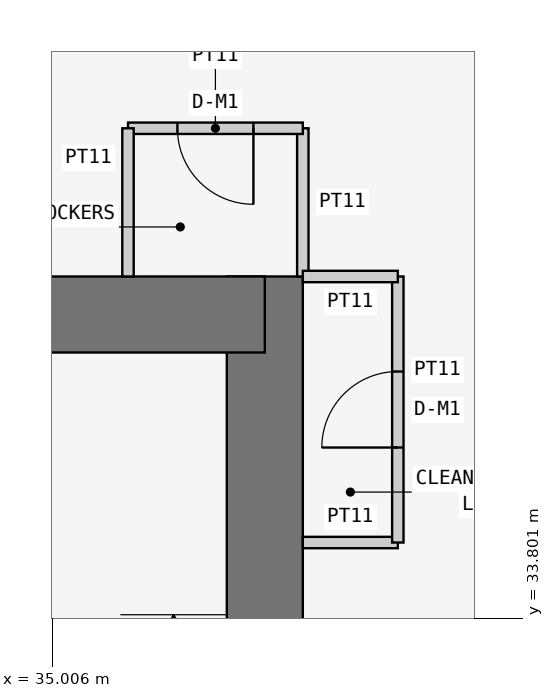
"""IFC4 building model, lengths in metres.
Left out: names, types, materials, properties, quantities, classifications, styles, units other than length and angle.
Written with IfcOpenShell. Run it as: python <this file> out.ifc"""

import sys

from ifc_helpers import new_model, si_unit, direction, frame, frame_2d, origin, place, context, subcontext, project, spatial, rectangle, extrude, element, fill, save


model = new_model("IFC4")
c1 = context("Model", 3, precision=1e-05, world=origin(), true_north=direction((0.0, 1.0)))
c2 = subcontext(c1, "Body", "Model", "MODEL_VIEW")
j1 = project(units=[si_unit("LENGTHUNIT", "METRE"), si_unit("PLANEANGLEUNIT", "RADIAN")], contexts=[c1])
p1 = place(None, origin())
s1 = spatial("IfcSite", under=j1, at=p1, CompositionType="ELEMENT")
p2 = place(p1, origin())
s2 = spatial("IfcBuilding", under=s1, at=p2, CompositionType="ELEMENT")
p3 = place(p2, frame((0.0, 0.0, 92.1)))
s3 = spatial("IfcBuildingStorey", under=s2, at=p3, CompositionType="ELEMENT", Elevation=92.1)
p4 = place(p3, frame((37.8, 21.0, 0.0), z_axis=(0.0, 0.0, 1.0), x_axis=(0.0, 1.0, 0.0)))
e1 = element("IfcWall", 1, at=p4, inside=s3, PredefinedType="SHEAR", context=c2, shape_type="SweptSolid", body=[
    extrude(rectangle(XDim=17.3, YDim=1.0, at=frame_2d((8.65, 0.0))), origin(), (0.0, 0.0, 1.0), 3.6),
])
p5 = place(p4, frame((5.2, 0.0, 0.0)))
e2 = element("IfcOpeningElement", 2, at=p5, cuts=e1, PredefinedType="OPENING", context=c2, shape_type="SweptSolid", body=[
    extrude(rectangle(XDim=1.2, YDim=2.1, at=frame_2d((0.6, 1.05))), frame((0.0, 0.51, 0.0), z_axis=(0.0, -1.0, 0.0), x_axis=(1.0, 0.0, 0.0)), (0.0, 0.0, 1.0), 1.02),
])
p6 = place(p3, frame((37.8, 37.8, 0.0), z_axis=(0.0, 0.0, 1.0), x_axis=(-1.0, 0.0, 0.0)))
e3 = element("IfcWall", 3, at=p6, inside=s3, PredefinedType="SHEAR", context=c2, shape_type="SweptSolid", body=[
    extrude(rectangle(XDim=17.3, YDim=1.0, at=frame_2d((8.65, 0.0))), origin(), (0.0, 0.0, 1.0), 3.6),
])
p7 = place(p3, frame((38.3, 38.3, 0.0), z_axis=(0.0, 0.0, 1.0), x_axis=(0.0, 1.0, 0.0)))
e4 = element("IfcWall", 4, at=p7, inside=s3, PredefinedType="PARTITIONING", context=c2, shape_type="SweptSolid", body=[
    extrude(rectangle(XDim=1.95, YDim=0.15, at=frame_2d((0.975, 0.0))), origin(), (0.0, 0.0, 1.0), 3.45),
])
p8 = place(p3, frame((38.3, 40.25, 0.0), z_axis=(0.0, 0.0, 1.0), x_axis=(-1.0, 0.0, 0.0)))
e5 = element("IfcWall", 5, at=p8, inside=s3, PredefinedType="PARTITIONING", context=c2, shape_type="SweptSolid", body=[
    extrude(rectangle(XDim=2.3, YDim=0.15, at=frame_2d((1.15, 0.0))), origin(), (0.0, 0.0, 1.0), 3.45),
])
p9 = place(p8, frame((0.65, 0.0, 0.0)))
e6 = element("IfcOpeningElement", 6, at=p9, cuts=e5, PredefinedType="OPENING", context=c2, shape_type="SweptSolid", body=[
    extrude(rectangle(XDim=1.0, YDim=2.1, at=frame_2d((0.5, 1.05))), frame((0.0, 0.085, 0.0), z_axis=(0.0, -1.0, 0.0), x_axis=(1.0, 0.0, 0.0)), (0.0, 0.0, 1.0), 0.17),
])
p10 = place(p3, frame((36.0, 40.25, 0.0), z_axis=(0.0, 0.0, 1.0), x_axis=(0.0, -1.0, 0.0)))
e7 = element("IfcWall", 7, at=p10, inside=s3, PredefinedType="PARTITIONING", context=c2, shape_type="SweptSolid", body=[
    extrude(rectangle(XDim=1.95, YDim=0.15, at=frame_2d((0.975, 0.0))), origin(), (0.0, 0.0, 1.0), 3.45),
])
p11 = place(p3, frame((38.3, 34.8, 0.0), z_axis=(0.0, 0.0, 1.0), x_axis=(1.0, 0.0, 0.0)))
e8 = element("IfcWall", 8, at=p11, inside=s3, PredefinedType="PARTITIONING", context=c2, shape_type="SweptSolid", body=[
    extrude(rectangle(XDim=1.25, YDim=0.15, at=frame_2d((0.625, 0.0))), origin(), (0.0, 0.0, 1.0), 3.45),
])
p12 = place(p3, frame((39.55, 34.8, 0.0), z_axis=(0.0, 0.0, 1.0), x_axis=(0.0, 1.0, 0.0)))
e9 = element("IfcWall", 9, at=p12, inside=s3, PredefinedType="PARTITIONING", context=c2, shape_type="SweptSolid", body=[
    extrude(rectangle(XDim=3.5, YDim=0.15, at=frame_2d((1.75, 0.0))), origin(), (0.0, 0.0, 1.0), 3.45),
])
p13 = place(p12, frame((1.25, 0.0, 0.0)))
e10 = element("IfcOpeningElement", 10, at=p13, cuts=e9, PredefinedType="OPENING", context=c2, shape_type="SweptSolid", body=[
    extrude(rectangle(XDim=1.0, YDim=2.1, at=frame_2d((0.5, 1.05))), frame((0.0, 0.085, 0.0), z_axis=(0.0, -1.0, 0.0), x_axis=(1.0, 0.0, 0.0)), (0.0, 0.0, 1.0), 0.17),
])
p14 = place(p3, frame((39.55, 38.3, 0.0), z_axis=(0.0, 0.0, 1.0), x_axis=(-1.0, 0.0, 0.0)))
e11 = element("IfcWall", 11, at=p14, inside=s3, PredefinedType="PARTITIONING", context=c2, shape_type="SweptSolid", body=[
    extrude(rectangle(XDim=1.25, YDim=0.15, at=frame_2d((0.625, 0.0))), origin(), (0.0, 0.0, 1.0), 3.45),
])
p15 = place(p9, origin())
e12 = element("IfcDoor", 12, at=p15, inside=s3, OperationType="SINGLE_SWING_LEFT", PredefinedType="DOOR", context=c2, shape_type="SweptSolid", body=[
    extrude(rectangle(XDim=1.0, YDim=2.1, at=frame_2d((0.5, 1.05))), frame((0.0, 0.025, 0.0), z_axis=(0.0, -1.0, 0.0), x_axis=(1.0, 0.0, 0.0)), (0.0, 0.0, 1.0), 0.05),
])
fill(e6, e12)
p16 = place(p13, origin())
e13 = element("IfcDoor", 13, at=p16, inside=s3, OperationType="SINGLE_SWING_LEFT", PredefinedType="DOOR", context=c2, shape_type="SweptSolid", body=[
    extrude(rectangle(XDim=1.0, YDim=2.1, at=frame_2d((0.5, 1.05))), frame((0.0, 0.025, 0.0), z_axis=(0.0, -1.0, 0.0), x_axis=(1.0, 0.0, 0.0)), (0.0, 0.0, 1.0), 0.05),
])
fill(e10, e13)
save(model, sys.argv[1])
